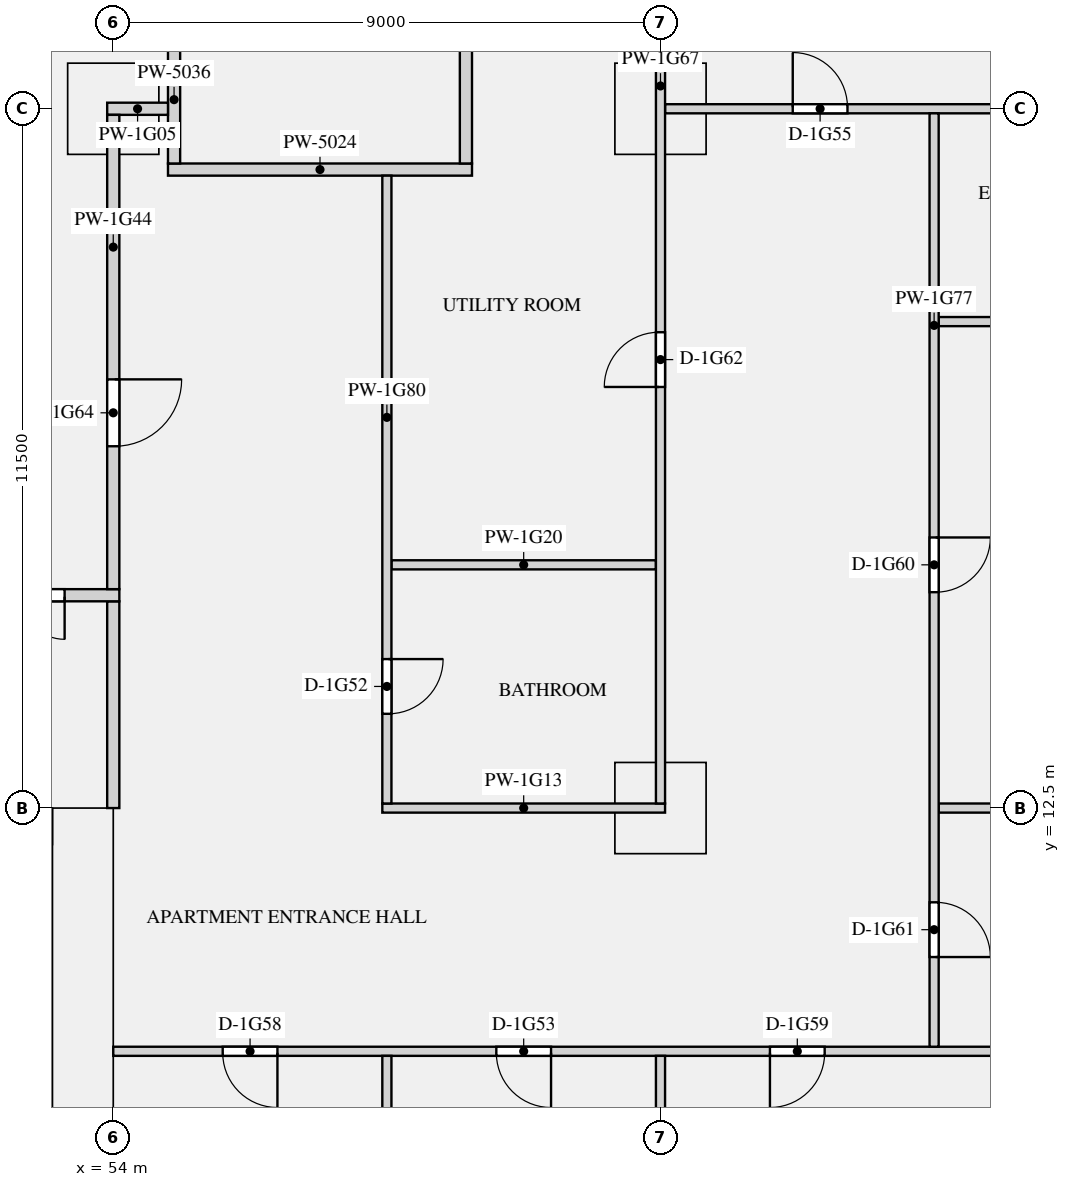
"""IFC4 building model, lengths in metres.
Left out: names, types, materials, properties, quantities, classifications, styles, units other than length and angle.
Written with IfcOpenShell. Run it as: python <this file> out.ifc"""

import sys

from ifc_helpers import new_model, si_unit, direction, frame, frame_2d, origin, origin_2d, place, context, subcontext, project, spatial, rectangle, extrude, element, fill, save


model = new_model("IFC4")
c1 = context("Model", 3, precision=1e-05, world=origin(), true_north=direction((0.0, 1.0)))
c2 = subcontext(c1, "Body", "Model", "MODEL_VIEW")
j1 = project(units=[si_unit("LENGTHUNIT", "METRE"), si_unit("PLANEANGLEUNIT", "RADIAN")], contexts=[c1])
p1 = place(None, origin())
s1 = spatial("IfcSite", under=j1, at=p1, CompositionType="ELEMENT")
p2 = place(p1, origin())
s2 = spatial("IfcBuilding", under=s1, at=p2, CompositionType="ELEMENT")
p3 = place(p2, frame((0.0, 0.0, 69.9)))
s3 = spatial("IfcBuildingStorey", under=s2, at=p3, CompositionType="ELEMENT", Elevation=69.9)
for number, where, z_axis, x_axis in (
    (1, (54.0, 24.0, 0.0), (0.0, 0.0, 1.0), (1.0, 0.0, 0.0)),
    (2, (63.0, 24.0, 0.0), (0.0, 0.0, 1.0), (1.0, 0.0, 0.0)),
    (3, (63.0, 12.5, 0.0), (0.0, 0.0, 1.0), (1.0, 0.0, 0.0)),
):
    element("IfcColumn", number, at=place(p3, frame(where, z_axis=z_axis, x_axis=x_axis)), inside=s3, PredefinedType="COLUMN", context=c2, shape_type="SweptSolid", body=[
        extrude(rectangle(XDim=1.5, YDim=1.5, at=origin_2d()), origin(), (0.0, 0.0, 1.0), 3.15),
    ])
p4 = place(p3, frame((53.5, 0.0, 0.0), z_axis=(0.0, 0.0, 1.0), x_axis=(0.0, 1.0, 0.0)))
e4 = element("IfcWall", 4, at=p4, inside=s3, PredefinedType="SHEAR", context=c2, shape_type="SweptSolid", body=[
    extrude(rectangle(XDim=12.5, YDim=1.0, at=frame_2d((6.25, 0.0))), origin(), (0.0, 0.0, 1.0), 3.15),
])
p5 = place(p3, frame((54.9, 23.0, 0.0), z_axis=(0.0, 0.0, 1.0), x_axis=(1.0, 0.0, 0.0)))
e5 = element("IfcWall", 5, at=p5, inside=s3, PredefinedType="PARTITIONING", context=c2, shape_type="SweptSolid", body=[
    extrude(rectangle(XDim=5.0, YDim=0.2, at=frame_2d((2.5, 0.0))), origin(), (0.0, 0.0, 1.0), 2.65),
])
p6 = place(p3, frame((54.0, 12.5, 0.0), z_axis=(0.0, 0.0, 1.0), x_axis=(0.0, 1.0, 0.0)))
e6 = element("IfcWall", 6, at=p6, inside=s3, PredefinedType="PARTITIONING", context=c2, shape_type="SweptSolid", body=[
    extrude(rectangle(XDim=3.4, YDim=0.2, at=frame_2d((1.7, 0.0))), origin(), (0.0, 0.0, 1.0), 2.65),
])
p7 = place(p3, frame((55.0, 23.1, 0.0), z_axis=(0.0, 0.0, 1.0), x_axis=(0.0, 1.0, 0.0)))
e7 = element("IfcWall", 7, at=p7, inside=s3, PredefinedType="PARTITIONING", context=c2, shape_type="SweptSolid", body=[
    extrude(rectangle(XDim=3.8, YDim=0.2, at=frame_2d((1.9, 0.0))), origin(), (0.0, 0.0, 1.0), 2.65),
])
p8 = place(p7, frame((2.1, 0.0, 0.0)))
e8 = element("IfcOpeningElement", 8, at=p8, cuts=e7, PredefinedType="OPENING", context=c2, shape_type="SweptSolid", body=[
    extrude(rectangle(XDim=1.2, YDim=2.1, at=frame_2d((0.6, 1.05))), frame((0.0, 0.11, 0.0), z_axis=(0.0, -1.0, 0.0), x_axis=(1.0, 0.0, 0.0)), (0.0, 0.0, 1.0), 0.22),
])
p9 = place(p3, frame((59.8, 23.1, 0.0), z_axis=(0.0, 0.0, 1.0), x_axis=(0.0, 1.0, 0.0)))
e9 = element("IfcWall", 9, at=p9, inside=s3, PredefinedType="PARTITIONING", context=c2, shape_type="SweptSolid", body=[
    extrude(rectangle(XDim=3.9, YDim=0.2, at=frame_2d((1.95, 0.0))), origin(), (0.0, 0.0, 1.0), 2.65),
])
p10 = place(p3, frame((63.075, 24.0, 0.0), z_axis=(0.0, 0.0, 1.0), x_axis=(1.0, 0.0, 0.0)))
e10 = element("IfcWall", 10, at=p10, inside=s3, PredefinedType="PARTITIONING", context=c2, shape_type="SweptSolid", body=[
    extrude(rectangle(XDim=10.125, YDim=0.15, at=frame_2d((5.062, 0.0))), origin(), (0.0, 0.0, 1.0), 2.65),
])
p11 = place(p10, frame((2.1, 0.0, 0.0)))
e11 = element("IfcOpeningElement", 11, at=p11, cuts=e10, PredefinedType="OPENING", context=c2, shape_type="SweptSolid", body=[
    extrude(rectangle(XDim=0.9, YDim=2.1, at=frame_2d((0.45, 1.05))), frame((0.0, 0.085, 0.0), z_axis=(0.0, -1.0, 0.0), x_axis=(1.0, 0.0, 0.0)), (0.0, 0.0, 1.0), 0.17),
])
p12 = place(p3, frame((53.9, 24.0, 0.0), z_axis=(0.0, 0.0, 1.0), x_axis=(1.0, 0.0, 0.0)))
e12 = element("IfcWall", 12, at=p12, inside=s3, PredefinedType="PARTITIONING", context=c2, shape_type="SweptSolid", body=[
    extrude(rectangle(XDim=1.0, YDim=0.2, at=frame_2d((0.5, 0.0))), origin(), (0.0, 0.0, 1.0), 2.65),
])
p13 = place(p3, frame((54.0, 8.5, 0.0), z_axis=(0.0, 0.0, 1.0), x_axis=(1.0, 0.0, 0.0)))
e13 = element("IfcWall", 13, at=p13, inside=s3, PredefinedType="PARTITIONING", context=c2, shape_type="SweptSolid", body=[
    extrude(rectangle(XDim=21.7, YDim=0.15, at=frame_2d((10.85, 0.0))), origin(), (0.0, 0.0, 1.0), 2.65),
])
p14 = place(p13, frame((6.3, 0.0, 0.0)))
e14 = element("IfcOpeningElement", 14, at=p14, cuts=e13, PredefinedType="OPENING", context=c2, shape_type="SweptSolid", body=[
    extrude(rectangle(XDim=0.9, YDim=2.1, at=frame_2d((0.45, 1.05))), frame((0.0, 0.085, 0.0), z_axis=(0.0, -1.0, 0.0), x_axis=(1.0, 0.0, 0.0)), (0.0, 0.0, 1.0), 0.17),
])
p15 = place(p13, frame((1.8, 0.0, 0.0)))
e15 = element("IfcOpeningElement", 15, at=p15, cuts=e13, PredefinedType="OPENING", context=c2, shape_type="SweptSolid", body=[
    extrude(rectangle(XDim=0.9, YDim=2.1, at=frame_2d((0.45, 1.05))), frame((0.0, 0.085, 0.0), z_axis=(0.0, -1.0, 0.0), x_axis=(1.0, 0.0, 0.0)), (0.0, 0.0, 1.0), 0.17),
])
p16 = place(p13, frame((10.8, 0.0, 0.0)))
e16 = element("IfcOpeningElement", 16, at=p16, cuts=e13, PredefinedType="OPENING", context=c2, shape_type="SweptSolid", body=[
    extrude(rectangle(XDim=0.9, YDim=2.1, at=frame_2d((0.45, 1.05))), frame((0.0, 0.085, 0.0), z_axis=(0.0, -1.0, 0.0), x_axis=(1.0, 0.0, 0.0)), (0.0, 0.0, 1.0), 0.17),
])
p17 = place(p13, frame((19.175, 0.0, 0.0)))
e17 = element("IfcOpeningElement", 17, at=p17, cuts=e13, PredefinedType="OPENING", context=c2, shape_type="SweptSolid", body=[
    extrude(rectangle(XDim=1.5, YDim=2.1, at=frame_2d((0.75, 1.05))), frame((0.0, 0.085, 0.0), z_axis=(0.0, -1.0, 0.0), x_axis=(1.0, 0.0, 0.0)), (0.0, 0.0, 1.0), 0.17),
])
p18 = place(p3, frame((58.425, 12.5, 0.0), z_axis=(0.0, 0.0, 1.0), x_axis=(1.0, 0.0, 0.0)))
e18 = element("IfcWall", 18, at=p18, inside=s3, PredefinedType="PARTITIONING", context=c2, shape_type="SweptSolid", body=[
    extrude(rectangle(XDim=4.65, YDim=0.15, at=frame_2d((2.325, 0.0))), origin(), (0.0, 0.0, 1.0), 2.65),
])
p19 = place(p3, frame((67.575, 12.5, 0.0), z_axis=(0.0, 0.0, 1.0), x_axis=(1.0, 0.0, 0.0)))
e19 = element("IfcWall", 19, at=p19, inside=s3, PredefinedType="PARTITIONING", context=c2, shape_type="SweptSolid", body=[
    extrude(rectangle(XDim=8.125, YDim=0.15, at=frame_2d((4.062, 0.0))), origin(), (0.0, 0.0, 1.0), 2.65),
])
p20 = place(p3, frame((67.575, 20.5, 0.0), z_axis=(0.0, 0.0, 1.0), x_axis=(1.0, 0.0, 0.0)))
e20 = element("IfcWall", 20, at=p20, inside=s3, PredefinedType="PARTITIONING", context=c2, shape_type="SweptSolid", body=[
    extrude(rectangle(XDim=5.625, YDim=0.15, at=frame_2d((2.812, 0.0))), origin(), (0.0, 0.0, 1.0), 2.65),
])
p21 = place(p20, frame((1.775, 0.0, 0.0)))
e21 = element("IfcOpeningElement", 21, at=p21, cuts=e20, PredefinedType="OPENING", context=c2, shape_type="SweptSolid", body=[
    extrude(rectangle(XDim=0.8, YDim=2.1, at=frame_2d((0.4, 1.05))), frame((0.0, 0.085, 0.0), z_axis=(0.0, -1.0, 0.0), x_axis=(1.0, 0.0, 0.0)), (0.0, 0.0, 1.0), 0.17),
])
p22 = place(p3, frame((58.575, 16.5, 0.0), z_axis=(0.0, 0.0, 1.0), x_axis=(1.0, 0.0, 0.0)))
e22 = element("IfcWall", 22, at=p22, inside=s3, PredefinedType="PARTITIONING", context=c2, shape_type="SweptSolid", body=[
    extrude(rectangle(XDim=4.35, YDim=0.15, at=frame_2d((2.175, 0.0))), origin(), (0.0, 0.0, 1.0), 2.65),
])
p23 = place(p3, frame((17.9, 16.0, 0.0), z_axis=(0.0, 0.0, 1.0), x_axis=(1.0, 0.0, 0.0)))
e23 = element("IfcWall", 23, at=p23, inside=s3, PredefinedType="PARTITIONING", context=c2, shape_type="SweptSolid", body=[
    extrude(rectangle(XDim=36.2, YDim=0.2, at=frame_2d((18.1, 0.0))), origin(), (0.0, 0.0, 1.0), 2.65),
])
p24 = place(p23, frame((0.9, 0.0, 0.0)))
e24 = element("IfcOpeningElement", 24, at=p24, cuts=e23, PredefinedType="OPENING", context=c2, shape_type="SweptSolid", body=[
    extrude(rectangle(XDim=1.4, YDim=2.1, at=frame_2d((0.7, 1.05))), frame((0.0, 0.11, 0.0), z_axis=(0.0, -1.0, 0.0), x_axis=(1.0, 0.0, 0.0)), (0.0, 0.0, 1.0), 0.22),
])
p25 = place(p23, frame((33.9, 0.0, 0.0)))
e25 = element("IfcOpeningElement", 25, at=p25, cuts=e23, PredefinedType="OPENING", context=c2, shape_type="SweptSolid", body=[
    extrude(rectangle(XDim=1.4, YDim=2.1, at=frame_2d((0.7, 1.05))), frame((0.0, 0.11, 0.0), z_axis=(0.0, -1.0, 0.0), x_axis=(1.0, 0.0, 0.0)), (0.0, 0.0, 1.0), 0.22),
])
p26 = place(p3, frame((54.0, 16.1, 0.0), z_axis=(0.0, 0.0, 1.0), x_axis=(0.0, 1.0, 0.0)))
e26 = element("IfcWall", 26, at=p26, inside=s3, PredefinedType="PARTITIONING", context=c2, shape_type="SweptSolid", body=[
    extrude(rectangle(XDim=7.8, YDim=0.2, at=frame_2d((3.9, 0.0))), origin(), (0.0, 0.0, 1.0), 2.65),
])
p27 = place(p26, frame((2.35, 0.0, 0.0)))
e27 = element("IfcOpeningElement", 27, at=p27, cuts=e26, PredefinedType="OPENING", context=c2, shape_type="SweptSolid", body=[
    extrude(rectangle(XDim=1.1, YDim=2.1, at=frame_2d((0.55, 1.05))), frame((0.0, 0.11, 0.0), z_axis=(0.0, -1.0, 0.0), x_axis=(1.0, 0.0, 0.0)), (0.0, 0.0, 1.0), 0.22),
])
p28 = place(p3, frame((63.0, 0.8, 0.0), z_axis=(0.0, 0.0, 1.0), x_axis=(0.0, 1.0, 0.0)))
e28 = element("IfcWall", 28, at=p28, inside=s3, PredefinedType="PARTITIONING", context=c2, shape_type="SweptSolid", body=[
    extrude(rectangle(XDim=7.625, YDim=0.15, at=frame_2d((3.812, 0.0))), origin(), (0.0, 0.0, 1.0), 2.65),
])
p29 = place(p3, frame((63.0, 12.575, 0.0), z_axis=(0.0, 0.0, 1.0), x_axis=(0.0, 1.0, 0.0)))
e29 = element("IfcWall", 29, at=p29, inside=s3, PredefinedType="PARTITIONING", context=c2, shape_type="SweptSolid", body=[
    extrude(rectangle(XDim=15.85, YDim=0.15, at=frame_2d((7.925, 0.0))), origin(), (0.0, 0.0, 1.0), 2.65),
])
p30 = place(p29, frame((6.85, 0.0, 0.0)))
e30 = element("IfcOpeningElement", 30, at=p30, cuts=e29, PredefinedType="OPENING", context=c2, shape_type="SweptSolid", body=[
    extrude(rectangle(XDim=0.9, YDim=2.1, at=frame_2d((0.45, 1.05))), frame((0.0, 0.085, 0.0), z_axis=(0.0, -1.0, 0.0), x_axis=(1.0, 0.0, 0.0)), (0.0, 0.0, 1.0), 0.17),
])
p31 = place(p3, frame((67.5, 8.575, 0.0), z_axis=(0.0, 0.0, 1.0), x_axis=(0.0, 1.0, 0.0)))
e31 = element("IfcWall", 31, at=p31, inside=s3, PredefinedType="PARTITIONING", context=c2, shape_type="SweptSolid", body=[
    extrude(rectangle(XDim=15.35, YDim=0.15, at=frame_2d((7.675, 0.0))), origin(), (0.0, 0.0, 1.0), 2.65),
])
p32 = place(p31, frame((7.475, 0.0, 0.0)))
e32 = element("IfcOpeningElement", 32, at=p32, cuts=e31, PredefinedType="OPENING", context=c2, shape_type="SweptSolid", body=[
    extrude(rectangle(XDim=0.9, YDim=2.1, at=frame_2d((0.45, 1.05))), frame((0.0, 0.085, 0.0), z_axis=(0.0, -1.0, 0.0), x_axis=(1.0, 0.0, 0.0)), (0.0, 0.0, 1.0), 0.17),
])
p33 = place(p31, frame((1.475, 0.0, 0.0)))
e33 = element("IfcOpeningElement", 33, at=p33, cuts=e31, PredefinedType="OPENING", context=c2, shape_type="SweptSolid", body=[
    extrude(rectangle(XDim=0.9, YDim=2.1, at=frame_2d((0.45, 1.05))), frame((0.0, 0.085, 0.0), z_axis=(0.0, -1.0, 0.0), x_axis=(1.0, 0.0, 0.0)), (0.0, 0.0, 1.0), 0.17),
])
p34 = place(p3, frame((58.5, 0.8, 0.0), z_axis=(0.0, 0.0, 1.0), x_axis=(0.0, 1.0, 0.0)))
e34 = element("IfcWall", 34, at=p34, inside=s3, PredefinedType="PARTITIONING", context=c2, shape_type="SweptSolid", body=[
    extrude(rectangle(XDim=7.625, YDim=0.15, at=frame_2d((3.812, 0.0))), origin(), (0.0, 0.0, 1.0), 2.65),
])
p35 = place(p3, frame((58.5, 12.575, 0.0), z_axis=(0.0, 0.0, 1.0), x_axis=(0.0, 1.0, 0.0)))
e35 = element("IfcWall", 35, at=p35, inside=s3, PredefinedType="PARTITIONING", context=c2, shape_type="SweptSolid", body=[
    extrude(rectangle(XDim=10.325, YDim=0.15, at=frame_2d((5.163, 0.0))), origin(), (0.0, 0.0, 1.0), 2.65),
])
p36 = place(p35, frame((1.475, 0.0, 0.0)))
e36 = element("IfcOpeningElement", 36, at=p36, cuts=e35, PredefinedType="OPENING", context=c2, shape_type="SweptSolid", body=[
    extrude(rectangle(XDim=0.9, YDim=2.1, at=frame_2d((0.45, 1.05))), frame((0.0, 0.085, 0.0), z_axis=(0.0, -1.0, 0.0), x_axis=(1.0, 0.0, 0.0)), (0.0, 0.0, 1.0), 0.17),
])
p37 = place(p25, frame((1.4, 0.0, 0.0), z_axis=(0.0, 0.0, 1.0), x_axis=(-1.0, 0.0, 0.0)))
e37 = element("IfcDoor", 37, at=p37, inside=s3, OperationType="DOUBLE_DOOR_SINGLE_SWING", PredefinedType="DOOR", context=c2, shape_type="SweptSolid", body=[
    extrude(rectangle(XDim=1.4, YDim=2.1, at=frame_2d((0.7, 1.05))), frame((0.0, 0.025, 0.0), z_axis=(0.0, -1.0, 0.0), x_axis=(1.0, 0.0, 0.0)), (0.0, 0.0, 1.0), 0.05),
])
fill(e25, e37)
p38 = place(p36, frame((0.9, 0.0, 0.0), z_axis=(0.0, 0.0, 1.0), x_axis=(-1.0, 0.0, 0.0)))
e38 = element("IfcDoor", 38, at=p38, inside=s3, OperationType="SINGLE_SWING_LEFT", PredefinedType="DOOR", context=c2, shape_type="SweptSolid", body=[
    extrude(rectangle(XDim=0.9, YDim=2.1, at=frame_2d((0.45, 1.05))), frame((0.0, 0.025, 0.0), z_axis=(0.0, -1.0, 0.0), x_axis=(1.0, 0.0, 0.0)), (0.0, 0.0, 1.0), 0.05),
])
fill(e36, e38)
p39 = place(p14, frame((0.9, 0.0, 0.0), z_axis=(0.0, 0.0, 1.0), x_axis=(-1.0, 0.0, 0.0)))
e39 = element("IfcDoor", 39, at=p39, inside=s3, OperationType="SINGLE_SWING_LEFT", PredefinedType="DOOR", context=c2, shape_type="SweptSolid", body=[
    extrude(rectangle(XDim=0.9, YDim=2.1, at=frame_2d((0.45, 1.05))), frame((0.0, 0.025, 0.0), z_axis=(0.0, -1.0, 0.0), x_axis=(1.0, 0.0, 0.0)), (0.0, 0.0, 1.0), 0.05),
])
fill(e14, e39)
p40 = place(p11, origin())
e40 = element("IfcDoor", 40, at=p40, inside=s3, OperationType="SINGLE_SWING_LEFT", PredefinedType="DOOR", context=c2, shape_type="SweptSolid", body=[
    extrude(rectangle(XDim=0.9, YDim=2.1, at=frame_2d((0.45, 1.05))), frame((0.0, 0.025, 0.0), z_axis=(0.0, -1.0, 0.0), x_axis=(1.0, 0.0, 0.0)), (0.0, 0.0, 1.0), 0.05),
])
fill(e11, e40)
p41 = place(p15, frame((0.9, 0.0, 0.0), z_axis=(0.0, 0.0, 1.0), x_axis=(-1.0, 0.0, 0.0)))
e41 = element("IfcDoor", 41, at=p41, inside=s3, OperationType="SINGLE_SWING_LEFT", PredefinedType="DOOR", context=c2, shape_type="SweptSolid", body=[
    extrude(rectangle(XDim=0.9, YDim=2.1, at=frame_2d((0.45, 1.05))), frame((0.0, 0.025, 0.0), z_axis=(0.0, -1.0, 0.0), x_axis=(1.0, 0.0, 0.0)), (0.0, 0.0, 1.0), 0.05),
])
fill(e15, e41)
p42 = place(p16, frame((0.9, 0.0, 0.0), z_axis=(0.0, 0.0, 1.0), x_axis=(-1.0, 0.0, 0.0)))
e42 = element("IfcDoor", 42, at=p42, inside=s3, OperationType="SINGLE_SWING_RIGHT", PredefinedType="DOOR", context=c2, shape_type="SweptSolid", body=[
    extrude(rectangle(XDim=0.9, YDim=2.1, at=frame_2d((0.45, 1.05))), frame((0.0, 0.025, 0.0), z_axis=(0.0, -1.0, 0.0), x_axis=(1.0, 0.0, 0.0)), (0.0, 0.0, 1.0), 0.05),
])
fill(e16, e42)
p43 = place(p32, frame((0.9, 0.0, 0.0), z_axis=(0.0, 0.0, 1.0), x_axis=(-1.0, 0.0, 0.0)))
e43 = element("IfcDoor", 43, at=p43, inside=s3, OperationType="SINGLE_SWING_LEFT", PredefinedType="DOOR", context=c2, shape_type="SweptSolid", body=[
    extrude(rectangle(XDim=0.9, YDim=2.1, at=frame_2d((0.45, 1.05))), frame((0.0, 0.025, 0.0), z_axis=(0.0, -1.0, 0.0), x_axis=(1.0, 0.0, 0.0)), (0.0, 0.0, 1.0), 0.05),
])
fill(e32, e43)
p44 = place(p33, frame((0.9, 0.0, 0.0), z_axis=(0.0, 0.0, 1.0), x_axis=(-1.0, 0.0, 0.0)))
e44 = element("IfcDoor", 44, at=p44, inside=s3, OperationType="SINGLE_SWING_RIGHT", PredefinedType="DOOR", context=c2, shape_type="SweptSolid", body=[
    extrude(rectangle(XDim=0.9, YDim=2.1, at=frame_2d((0.45, 1.05))), frame((0.0, 0.025, 0.0), z_axis=(0.0, -1.0, 0.0), x_axis=(1.0, 0.0, 0.0)), (0.0, 0.0, 1.0), 0.05),
])
fill(e33, e44)
p45 = place(p30, origin())
e45 = element("IfcDoor", 45, at=p45, inside=s3, OperationType="SINGLE_SWING_LEFT", PredefinedType="DOOR", context=c2, shape_type="SweptSolid", body=[
    extrude(rectangle(XDim=0.9, YDim=2.1, at=frame_2d((0.45, 1.05))), frame((0.0, 0.025, 0.0), z_axis=(0.0, -1.0, 0.0), x_axis=(1.0, 0.0, 0.0)), (0.0, 0.0, 1.0), 0.05),
])
fill(e30, e45)
p46 = place(p27, frame((1.1, 0.0, 0.0), z_axis=(0.0, 0.0, 1.0), x_axis=(-1.0, 0.0, 0.0)))
e46 = element("IfcDoor", 46, at=p46, inside=s3, OperationType="SINGLE_SWING_LEFT", PredefinedType="DOOR", context=c2, shape_type="SweptSolid", body=[
    extrude(rectangle(XDim=1.1, YDim=2.1, at=frame_2d((0.55, 1.05))), frame((0.0, 0.025, 0.0), z_axis=(0.0, -1.0, 0.0), x_axis=(1.0, 0.0, 0.0)), (0.0, 0.0, 1.0), 0.05),
])
fill(e27, e46)
save(model, sys.argv[1])
